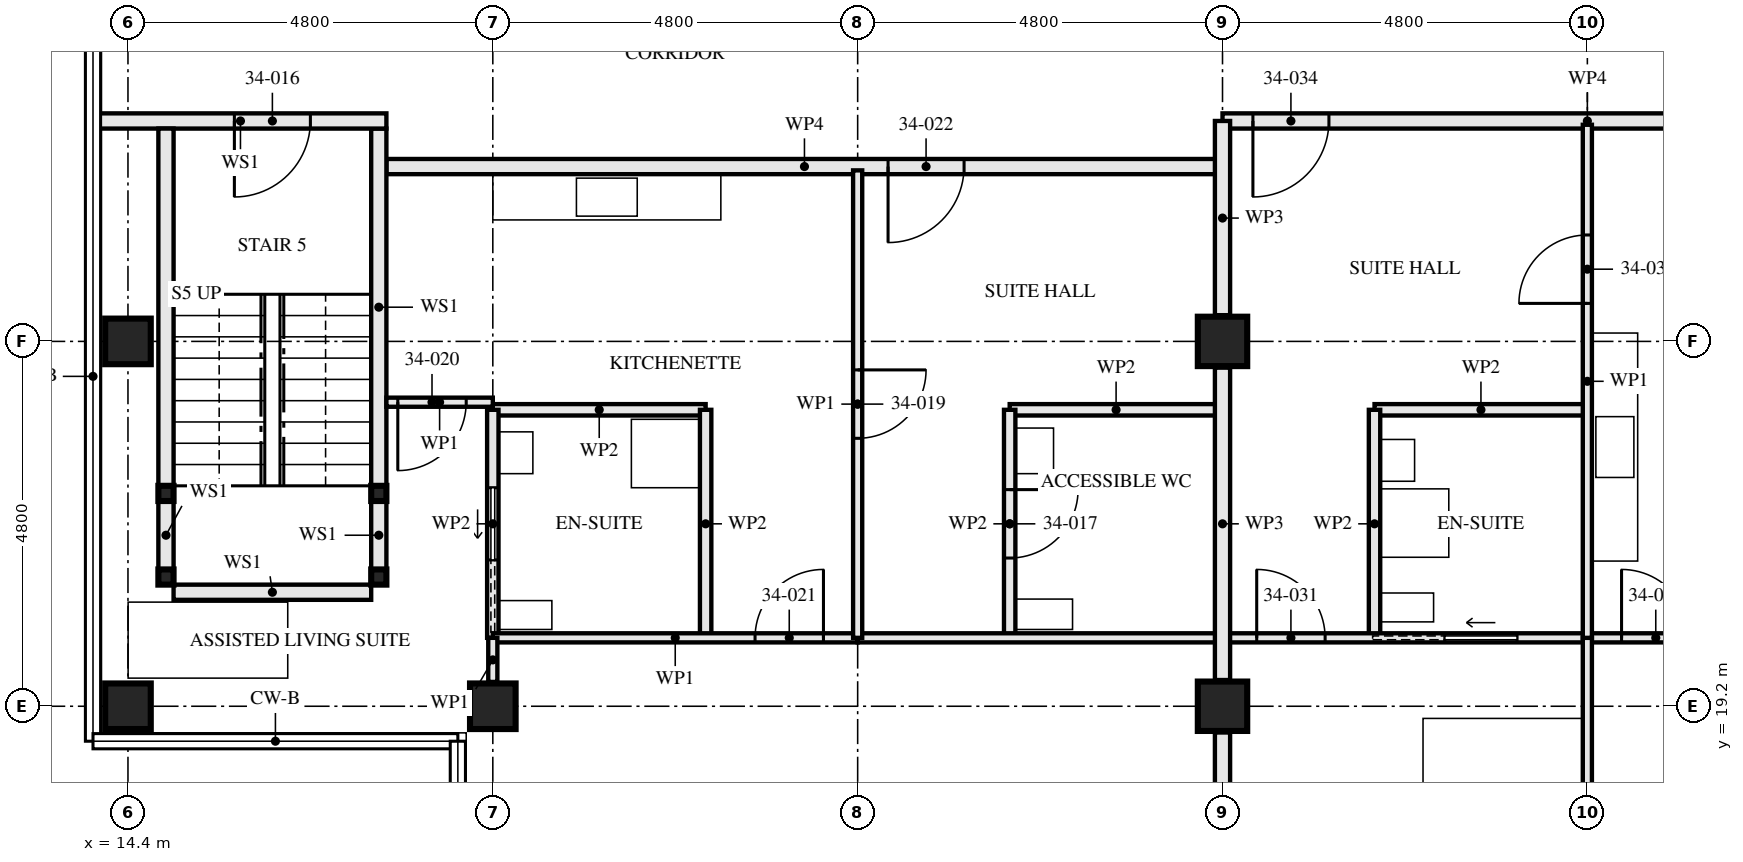
"""IFC4 building model, lengths in metres.
Left out: names, types, materials, properties, quantities, classifications, styles, units other than length and angle.
Written with IfcOpenShell. Run it as: python <this file> out.ifc"""

import sys

from ifc_helpers import new_model, si_unit, direction, frame, frame_2d, origin, origin_2d, place, context, subcontext, project, spatial, rectangle, hollow_rectangle, extrude, element, fill, save


model = new_model("IFC4")
c1 = context("Model", 3, precision=1e-05, world=origin(), true_north=direction((0.0, 1.0)))
c2 = subcontext(c1, "Body", "Model", "MODEL_VIEW")
j1 = project(units=[si_unit("LENGTHUNIT", "METRE"), si_unit("PLANEANGLEUNIT", "RADIAN")], contexts=[c1])
p1 = place(None, origin())
s1 = spatial("IfcSite", under=j1, at=p1, CompositionType="ELEMENT")
p2 = place(p1, origin())
s2 = spatial("IfcBuilding", under=s1, at=p2, CompositionType="ELEMENT")
p3 = place(p2, frame((0.0, 0.0, 126.0)))
s3 = spatial("IfcBuildingStorey", under=s2, at=p3, CompositionType="ELEMENT", Elevation=126.0)
for number, where, z_axis, x_axis in (
    (1, (14.4, 19.2, 0.0), (0.0, 0.0, 1.0), (0.0, 1.0, 0.0)),
    (2, (14.4, 24.0, 0.0), (0.0, 0.0, 1.0), (1.0, 0.0, 0.0)),
    (3, (19.2, 19.2, 0.0), (0.0, 0.0, 1.0), (0.0, 1.0, 0.0)),
):
    element("IfcColumn", number, at=place(p3, frame(where, z_axis=z_axis, x_axis=x_axis)), inside=s3, PredefinedType="COLUMN", context=c2, shape_type="SweptSolid", body=[
        extrude(hollow_rectangle(XDim=0.6, YDim=0.6, WallThickness=0.08, at=origin_2d()), origin(), (0.0, 0.0, 1.0), 3.5),
    ])
for number, where, z_axis, x_axis in (
    (4, (28.8, 19.2, 0.0), (0.0, 0.0, 1.0), (1.0, 0.0, 0.0)),
    (5, (28.8, 24.0, 0.0), (0.0, 0.0, 1.0), (1.0, 0.0, 0.0)),
):
    element("IfcColumn", number, at=place(p3, frame(where, z_axis=z_axis, x_axis=x_axis)), inside=s3, PredefinedType="COLUMN", context=c2, shape_type="SweptSolid", body=[
        extrude(hollow_rectangle(XDim=0.65, YDim=0.65, WallThickness=0.05, at=origin_2d()), origin(), (0.0, 0.0, 1.0), 3.5),
    ])
for number, where, z_axis, x_axis in (
    (6, (14.9, 20.9, 0.0), (0.0, 0.0, 1.0), (1.0, 0.0, 0.0)),
    (7, (17.7, 20.9, 0.0), (0.0, 0.0, 1.0), (1.0, 0.0, 0.0)),
    (8, (14.9, 22.0, 0.0), (0.0, 0.0, 1.0), (1.0, 0.0, 0.0)),
    (9, (17.7, 22.0, 0.0), (0.0, 0.0, 1.0), (1.0, 0.0, 0.0)),
):
    element("IfcColumn", number, at=place(p3, frame(where, z_axis=z_axis, x_axis=x_axis)), inside=s3, PredefinedType="COLUMN", context=c2, shape_type="SweptSolid", body=[
        extrude(hollow_rectangle(XDim=0.2, YDim=0.2, WallThickness=0.008, at=origin_2d()), origin(), (0.0, 0.0, 1.0), 3.33),
    ])
p4 = place(p3, frame((14.9, 21.0, 0.0), z_axis=(0.0, 0.0, 1.0), x_axis=(0.0, 1.0, 0.0)))
e10 = element("IfcWall", 10, at=p4, inside=s3, PredefinedType="SOLIDWALL", context=c2, shape_type="SweptSolid", body=[
    extrude(rectangle(XDim=0.9, YDim=0.2, at=frame_2d((0.45, 0.0))), origin(), (0.0, 0.0, 1.0), 2.99),
])
p5 = place(p3, frame((14.9, 22.1, 0.0), z_axis=(0.0, 0.0, 1.0), x_axis=(0.0, 1.0, 0.0)))
e11 = element("IfcWall", 11, at=p5, inside=s3, PredefinedType="SOLIDWALL", context=c2, shape_type="SweptSolid", body=[
    extrude(rectangle(XDim=4.7, YDim=0.2, at=frame_2d((2.35, 0.0))), origin(), (0.0, 0.0, 1.0), 2.99),
])
p6 = place(p3, frame((17.7, 21.0, 0.0), z_axis=(0.0, 0.0, 1.0), x_axis=(0.0, 1.0, 0.0)))
e12 = element("IfcWall", 12, at=p6, inside=s3, PredefinedType="SOLIDWALL", context=c2, shape_type="SweptSolid", body=[
    extrude(rectangle(XDim=0.9, YDim=0.2, at=frame_2d((0.45, 0.0))), origin(), (0.0, 0.0, 1.0), 2.99),
])
p7 = place(p3, frame((17.7, 22.1, 0.0), z_axis=(0.0, 0.0, 1.0), x_axis=(0.0, 1.0, 0.0)))
e13 = element("IfcWall", 13, at=p7, inside=s3, PredefinedType="SOLIDWALL", context=c2, shape_type="SweptSolid", body=[
    extrude(rectangle(XDim=4.7, YDim=0.2, at=frame_2d((2.35, 0.0))), origin(), (0.0, 0.0, 1.0), 2.99),
])
p8 = place(p3, frame((15.0, 20.7, 0.0), z_axis=(0.0, 0.0, 1.0), x_axis=(1.0, 0.0, 0.0)))
e14 = element("IfcWall", 14, at=p8, inside=s3, PredefinedType="SOLIDWALL", context=c2, shape_type="SweptSolid", body=[
    extrude(rectangle(XDim=2.6, YDim=0.2, at=frame_2d((1.3, 0.0))), origin(), (0.0, 0.0, 1.0), 3.33),
])
p9 = place(p3, frame((13.96, 26.9, 0.0), z_axis=(0.0, 0.0, 1.0), x_axis=(1.0, 0.0, 0.0)))
e15 = element("IfcWall", 15, at=p9, inside=s3, PredefinedType="SOLIDWALL", context=c2, shape_type="SweptSolid", body=[
    extrude(rectangle(XDim=3.84, YDim=0.2, at=frame_2d((1.92, 0.0))), origin(), (0.0, 0.0, 1.0), 2.32),
])
p10 = place(p9, frame((1.84, 0.0, 0.0)))
e16 = element("IfcOpeningElement", 16, at=p10, cuts=e15, PredefinedType="OPENING", context=c2, shape_type="SweptSolid", body=[
    extrude(rectangle(XDim=1.0, YDim=2.1, at=frame_2d((0.5, 1.05))), frame((0.0, 0.111, 0.0), z_axis=(0.0, -1.0, 0.0), x_axis=(1.0, 0.0, 0.0)), (0.0, 0.0, 1.0), 0.221),
])
p11 = place(p3, frame((26.0, 20.1, 0.0), z_axis=(0.0, 0.0, 1.0), x_axis=(0.0, 1.0, 0.0)))
e17 = element("IfcWall", 17, at=p11, inside=s3, PredefinedType="PARTITIONING", context=c2, shape_type="SweptSolid", body=[
    extrude(rectangle(XDim=3.0, YDim=0.15, at=frame_2d((1.5, 0.0))), origin(), (0.0, 0.0, 1.0), 3.33),
])
p12 = place(p11, frame((1.05, 0.0, 0.0)))
e18 = element("IfcOpeningElement", 18, at=p12, cuts=e17, PredefinedType="OPENING", context=c2, shape_type="SweptSolid", body=[
    extrude(rectangle(XDim=0.9, YDim=2.1, at=frame_2d((0.45, 1.05))), frame((0.0, 0.085, 0.0), z_axis=(0.0, -1.0, 0.0), x_axis=(1.0, 0.0, 0.0)), (0.0, 0.0, 1.0), 0.171),
])
p13 = place(p3, frame((26.0, 23.1, 0.0), z_axis=(0.0, 0.0, 1.0), x_axis=(1.0, 0.0, 0.0)))
e19 = element("IfcWall", 19, at=p13, inside=s3, PredefinedType="PARTITIONING", context=c2, shape_type="SweptSolid", body=[
    extrude(rectangle(XDim=2.8, YDim=0.15, at=frame_2d((1.4, 0.0))), origin(), (0.0, 0.0, 1.0), 3.33),
])
p14 = place(p3, frame((19.2, 20.1, 0.0), z_axis=(0.0, 0.0, 1.0), x_axis=(0.0, 1.0, 0.0)))
e20 = element("IfcWall", 20, at=p14, inside=s3, PredefinedType="PARTITIONING", context=c2, shape_type="SweptSolid", body=[
    extrude(rectangle(XDim=3.0, YDim=0.15, at=frame_2d((1.5, 0.0))), origin(), (0.0, 0.0, 1.0), 2.55),
])
p15 = place(p14, frame((1.025, 0.0, 0.0)))
e21 = element("IfcOpeningElement", 21, at=p15, cuts=e20, PredefinedType="OPENING", context=c2, shape_type="SweptSolid", body=[
    extrude(rectangle(XDim=0.95, YDim=2.1, at=frame_2d((0.475, 1.05))), frame((0.0, 0.085, 0.0), z_axis=(0.0, -1.0, 0.0), x_axis=(1.0, 0.0, 0.0)), (0.0, 0.0, 1.0), 0.171),
])
p16 = place(p3, frame((22.0, 20.1, 0.0), z_axis=(0.0, 0.0, 1.0), x_axis=(0.0, 1.0, 0.0)))
e22 = element("IfcWall", 22, at=p16, inside=s3, PredefinedType="PARTITIONING", context=c2, shape_type="SweptSolid", body=[
    extrude(rectangle(XDim=3.0, YDim=0.15, at=frame_2d((1.5, 0.0))), origin(), (0.0, 0.0, 1.0), 3.33),
])
p17 = place(p3, frame((19.2, 23.1, 0.0), z_axis=(0.0, 0.0, 1.0), x_axis=(1.0, 0.0, 0.0)))
e23 = element("IfcWall", 23, at=p17, inside=s3, PredefinedType="PARTITIONING", context=c2, shape_type="SweptSolid", body=[
    extrude(rectangle(XDim=2.8, YDim=0.15, at=frame_2d((1.4, 0.0))), origin(), (0.0, 0.0, 1.0), 3.33),
])
p18 = place(p3, frame((24.0, 20.1, 0.0), z_axis=(0.0, 0.0, 1.0), x_axis=(0.0, 1.0, 0.0)))
e24 = element("IfcWall", 24, at=p18, inside=s3, PredefinedType="PARTITIONING", context=c2, shape_type="SweptSolid", body=[
    extrude(rectangle(XDim=6.15, YDim=0.12, at=frame_2d((3.075, 0.0))), origin(), (0.0, 0.0, 1.0), 2.55),
])
p19 = place(p18, frame((2.625, 0.0, 0.0)))
e25 = element("IfcOpeningElement", 25, at=p19, cuts=e24, PredefinedType="OPENING", context=c2, shape_type="SweptSolid", body=[
    extrude(rectangle(XDim=0.9, YDim=2.1, at=frame_2d((0.45, 1.05))), frame((0.0, 0.071, 0.0), z_axis=(0.0, -1.0, 0.0), x_axis=(1.0, 0.0, 0.0)), (0.0, 0.0, 1.0), 0.141),
])
p20 = place(p3, frame((17.8, 23.2, 0.0), z_axis=(0.0, 0.0, 1.0), x_axis=(1.0, 0.0, 0.0)))
e26 = element("IfcWall", 26, at=p20, inside=s3, PredefinedType="PARTITIONING", context=c2, shape_type="SweptSolid", body=[
    extrude(rectangle(XDim=1.4, YDim=0.12, at=frame_2d((0.7, 0.0))), origin(), (0.0, 0.0, 1.0), 3.33),
])
p21 = place(p20, frame((0.15, 0.0, 0.0)))
e27 = element("IfcOpeningElement", 27, at=p21, cuts=e26, PredefinedType="OPENING", context=c2, shape_type="SweptSolid", body=[
    extrude(rectangle(XDim=0.9, YDim=2.1, at=frame_2d((0.45, 1.05))), frame((0.0, 0.071, 0.0), z_axis=(0.0, -1.0, 0.0), x_axis=(1.0, 0.0, 0.0)), (0.0, 0.0, 1.0), 0.141),
])
p22 = place(p3, frame((19.2, 20.1, 0.0), z_axis=(0.0, 0.0, 1.0), x_axis=(1.0, 0.0, 0.0)))
e28 = element("IfcWall", 28, at=p22, inside=s3, PredefinedType="PARTITIONING", context=c2, shape_type="SweptSolid", body=[
    extrude(rectangle(XDim=4.8, YDim=0.12, at=frame_2d((2.4, 0.0))), origin(), (0.0, 0.0, 1.0), 3.33),
])
p23 = place(p22, frame((3.45, 0.0, 0.0)))
e29 = element("IfcOpeningElement", 29, at=p23, cuts=e28, PredefinedType="OPENING", context=c2, shape_type="SweptSolid", body=[
    extrude(rectangle(XDim=0.9, YDim=2.1, at=frame_2d((0.45, 1.05))), frame((0.0, 0.071, 0.0), z_axis=(0.0, -1.0, 0.0), x_axis=(1.0, 0.0, 0.0)), (0.0, 0.0, 1.0), 0.141),
])
p24 = place(p3, frame((24.0, 20.1, 0.0), z_axis=(0.0, 0.0, 1.0), x_axis=(1.0, 0.0, 0.0)))
e30 = element("IfcWall", 30, at=p24, inside=s3, PredefinedType="PARTITIONING", context=c2, shape_type="SweptSolid", body=[
    extrude(rectangle(XDim=4.8, YDim=0.12, at=frame_2d((2.4, 0.0))), origin(), (0.0, 0.0, 1.0), 3.33),
])
p25 = place(p3, frame((19.2, 19.52, 0.0), z_axis=(0.0, 0.0, 1.0), x_axis=(0.0, 1.0, 0.0)))
e31 = element("IfcWall", 31, at=p25, inside=s3, PredefinedType="PARTITIONING", context=c2, shape_type="SweptSolid", body=[
    extrude(rectangle(XDim=0.58, YDim=0.12, at=frame_2d((0.29, 0.0))), origin(), (0.0, 0.0, 1.0), 2.55),
])
p26 = place(p3, frame((17.8, 26.3, 0.0), z_axis=(0.0, 0.0, 1.0), x_axis=(1.0, 0.0, 0.0)))
e32 = element("IfcWall", 32, at=p26, inside=s3, PredefinedType="PARTITIONING", context=c2, shape_type="SweptSolid", body=[
    extrude(rectangle(XDim=11.0, YDim=0.2, at=frame_2d((5.5, 0.0))), origin(), (0.0, 0.0, 1.0), 2.55),
])
p27 = place(p26, frame((6.6, 0.0, 0.0)))
e33 = element("IfcOpeningElement", 33, at=p27, cuts=e32, PredefinedType="OPENING", context=c2, shape_type="SweptSolid", body=[
    extrude(rectangle(XDim=1.0, YDim=2.1, at=frame_2d((0.5, 1.05))), frame((0.0, 0.111, 0.0), z_axis=(0.0, -1.0, 0.0), x_axis=(1.0, 0.0, 0.0)), (0.0, 0.0, 1.0), 0.221),
])
p28 = place(p3, frame((30.8, 20.1, 0.0), z_axis=(0.0, 0.0, 1.0), x_axis=(0.0, 1.0, 0.0)))
e34 = element("IfcWall", 34, at=p28, inside=s3, PredefinedType="PARTITIONING", context=c2, shape_type="SweptSolid", body=[
    extrude(rectangle(XDim=3.0, YDim=0.15, at=frame_2d((1.5, 0.0))), origin(), (0.0, 0.0, 1.0), 3.33),
])
p29 = place(p3, frame((30.8, 23.1, 0.0), z_axis=(0.0, 0.0, 1.0), x_axis=(1.0, 0.0, 0.0)))
e35 = element("IfcWall", 35, at=p29, inside=s3, PredefinedType="PARTITIONING", context=c2, shape_type="SweptSolid", body=[
    extrude(rectangle(XDim=2.8, YDim=0.15, at=frame_2d((1.4, 0.0))), origin(), (0.0, 0.0, 1.0), 3.33),
])
p30 = place(p3, frame((33.6, 20.1, 0.0), z_axis=(0.0, 0.0, 1.0), x_axis=(0.0, 1.0, 0.0)))
e36 = element("IfcWall", 36, at=p30, inside=s3, PredefinedType="PARTITIONING", context=c2, shape_type="SweptSolid", body=[
    extrude(rectangle(XDim=6.75, YDim=0.12, at=frame_2d((3.375, 0.0))), origin(), (0.0, 0.0, 1.0), 2.55),
])
p31 = place(p30, frame((4.4, 0.0, 0.0)))
e37 = element("IfcOpeningElement", 37, at=p31, cuts=e36, PredefinedType="OPENING", context=c2, shape_type="SweptSolid", body=[
    extrude(rectangle(XDim=0.9, YDim=2.1, at=frame_2d((0.45, 1.05))), frame((0.0, 0.071, 0.0), z_axis=(0.0, -1.0, 0.0), x_axis=(1.0, 0.0, 0.0)), (0.0, 0.0, 1.0), 0.141),
])
p32 = place(p3, frame((28.8, 20.1, 0.0), z_axis=(0.0, 0.0, 1.0), x_axis=(1.0, 0.0, 0.0)))
e38 = element("IfcWall", 38, at=p32, inside=s3, PredefinedType="PARTITIONING", context=c2, shape_type="SweptSolid", body=[
    extrude(rectangle(XDim=4.8, YDim=0.12, at=frame_2d((2.4, 0.0))), origin(), (0.0, 0.0, 1.0), 3.33),
])
p33 = place(p32, frame((0.45, 0.0, 0.0)))
e39 = element("IfcOpeningElement", 39, at=p33, cuts=e38, PredefinedType="OPENING", context=c2, shape_type="SweptSolid", body=[
    extrude(rectangle(XDim=0.9, YDim=2.1, at=frame_2d((0.45, 1.05))), frame((0.0, 0.071, 0.0), z_axis=(0.0, -1.0, 0.0), x_axis=(1.0, 0.0, 0.0)), (0.0, 0.0, 1.0), 0.141),
])
p34 = place(p32, frame((2.925, 0.0, 0.0)))
e40 = element("IfcOpeningElement", 40, at=p34, cuts=e38, PredefinedType="OPENING", context=c2, shape_type="SweptSolid", body=[
    extrude(rectangle(XDim=0.95, YDim=2.1, at=frame_2d((0.475, 1.05))), frame((0.0, 0.071, 0.0), z_axis=(0.0, -1.0, 0.0), x_axis=(1.0, 0.0, 0.0)), (0.0, 0.0, 1.0), 0.141),
])
p35 = place(p3, frame((33.6, 20.1, 0.0), z_axis=(0.0, 0.0, 1.0), x_axis=(1.0, 0.0, 0.0)))
e41 = element("IfcWall", 41, at=p35, inside=s3, PredefinedType="PARTITIONING", context=c2, shape_type="SweptSolid", body=[
    extrude(rectangle(XDim=4.8, YDim=0.12, at=frame_2d((2.4, 0.0))), origin(), (0.0, 0.0, 1.0), 3.33),
])
p36 = place(p35, frame((0.45, 0.0, 0.0)))
e42 = element("IfcOpeningElement", 42, at=p36, cuts=e41, PredefinedType="OPENING", context=c2, shape_type="SweptSolid", body=[
    extrude(rectangle(XDim=0.9, YDim=2.1, at=frame_2d((0.45, 1.05))), frame((0.0, 0.071, 0.0), z_axis=(0.0, -1.0, 0.0), x_axis=(1.0, 0.0, 0.0)), (0.0, 0.0, 1.0), 0.141),
])
p37 = place(p3, frame((33.6, 14.72, 0.0), z_axis=(0.0, 0.0, 1.0), x_axis=(0.0, 1.0, 0.0)))
e43 = element("IfcWall", 43, at=p37, inside=s3, PredefinedType="PARTITIONING", context=c2, shape_type="SweptSolid", body=[
    extrude(rectangle(XDim=5.38, YDim=0.12, at=frame_2d((2.69, 0.0))), origin(), (0.0, 0.0, 1.0), 2.55),
])
p38 = place(p3, frame((28.8, 26.9, 0.0), z_axis=(0.0, 0.0, 1.0), x_axis=(1.0, 0.0, 0.0)))
e44 = element("IfcWall", 44, at=p38, inside=s3, PredefinedType="PARTITIONING", context=c2, shape_type="SweptSolid", body=[
    extrude(rectangle(XDim=9.6, YDim=0.2, at=frame_2d((4.8, 0.0))), origin(), (0.0, 0.0, 1.0), 3.33),
])
p39 = place(p38, frame((0.4, 0.0, 0.0)))
e45 = element("IfcOpeningElement", 45, at=p39, cuts=e44, PredefinedType="OPENING", context=c2, shape_type="SweptSolid", body=[
    extrude(rectangle(XDim=1.0, YDim=2.1, at=frame_2d((0.5, 1.05))), frame((0.0, 0.111, 0.0), z_axis=(0.0, -1.0, 0.0), x_axis=(1.0, 0.0, 0.0)), (0.0, 0.0, 1.0), 0.221),
])
p40 = place(p3, frame((28.8, 14.72, 0.0), z_axis=(0.0, 0.0, 1.0), x_axis=(0.0, 1.0, 0.0)))
e46 = element("IfcWall", 46, at=p40, inside=s3, PredefinedType="PARTITIONING", context=c2, shape_type="SweptSolid", body=[
    extrude(rectangle(XDim=4.135, YDim=0.2, at=frame_2d((2.067, 0.0))), origin(), (0.0, 0.0, 1.0), 2.32),
])
p41 = place(p3, frame((28.8, 19.545, 0.0), z_axis=(0.0, 0.0, 1.0), x_axis=(0.0, 1.0, 0.0)))
e47 = element("IfcWall", 47, at=p41, inside=s3, PredefinedType="PARTITIONING", context=c2, shape_type="SweptSolid", body=[
    extrude(rectangle(XDim=4.11, YDim=0.2, at=frame_2d((2.055, 0.0))), origin(), (0.0, 0.0, 1.0), 2.32),
])
p42 = place(p3, frame((28.8, 24.345, 0.0), z_axis=(0.0, 0.0, 1.0), x_axis=(0.0, 1.0, 0.0)))
e48 = element("IfcWall", 48, at=p42, inside=s3, PredefinedType="PARTITIONING", context=c2, shape_type="SweptSolid", body=[
    extrude(rectangle(XDim=2.555, YDim=0.2, at=frame_2d((1.277, 0.0))), origin(), (0.0, 0.0, 1.0), 2.32),
])
p43 = place(p10, frame((1.0, 0.0, 0.0), z_axis=(0.0, 0.0, 1.0), x_axis=(-1.0, 0.0, 0.0)))
e49 = element("IfcDoor", 49, at=p43, inside=s3, OperationType="SINGLE_SWING_LEFT", PredefinedType="DOOR", context=c2, shape_type="SweptSolid", body=[
    extrude(rectangle(XDim=1.0, YDim=2.1, at=frame_2d((0.5, 1.05))), frame((0.0, 0.032, 0.0), z_axis=(0.0, -1.0, 0.0), x_axis=(1.0, 0.0, 0.0)), (0.0, 0.0, 1.0), 0.064),
])
fill(e16, e49)
p44 = place(p12, frame((0.9, 0.0, 0.0), z_axis=(0.0, 0.0, 1.0), x_axis=(-1.0, 0.0, 0.0)))
e50 = element("IfcDoor", 50, at=p44, inside=s3, OperationType="SINGLE_SWING_RIGHT", PredefinedType="DOOR", context=c2, shape_type="SweptSolid", body=[
    extrude(rectangle(XDim=0.9, YDim=2.1, at=frame_2d((0.45, 1.05))), frame((0.0, 0.022, 0.0), z_axis=(0.0, -1.0, 0.0), x_axis=(1.0, 0.0, 0.0)), (0.0, 0.0, 1.0), 0.044),
])
fill(e18, e50)
p45 = place(p15, origin())
e51 = element("IfcDoor", 51, at=p45, inside=s3, OperationType="SLIDING_TO_RIGHT", PredefinedType="DOOR", context=c2, shape_type="SweptSolid", body=[
    extrude(rectangle(XDim=0.95, YDim=2.1, at=frame_2d((0.475, 1.05))), frame((0.0, 0.022, 0.0), z_axis=(0.0, -1.0, 0.0), x_axis=(1.0, 0.0, 0.0)), (0.0, 0.0, 1.0), 0.044),
])
fill(e21, e51)
p46 = place(p19, frame((0.9, 0.0, 0.0), z_axis=(0.0, 0.0, 1.0), x_axis=(-1.0, 0.0, 0.0)))
e52 = element("IfcDoor", 52, at=p46, inside=s3, OperationType="SINGLE_SWING_RIGHT", PredefinedType="DOOR", context=c2, shape_type="SweptSolid", body=[
    extrude(rectangle(XDim=0.9, YDim=2.1, at=frame_2d((0.45, 1.05))), frame((0.0, 0.022, 0.0), z_axis=(0.0, -1.0, 0.0), x_axis=(1.0, 0.0, 0.0)), (0.0, 0.0, 1.0), 0.044),
])
fill(e25, e52)
p47 = place(p21, frame((0.9, 0.0, 0.0), z_axis=(0.0, 0.0, 1.0), x_axis=(-1.0, 0.0, 0.0)))
e53 = element("IfcDoor", 53, at=p47, inside=s3, OperationType="SINGLE_SWING_LEFT", PredefinedType="DOOR", context=c2, shape_type="SweptSolid", body=[
    extrude(rectangle(XDim=0.9, YDim=2.1, at=frame_2d((0.45, 1.05))), frame((0.0, 0.022, 0.0), z_axis=(0.0, -1.0, 0.0), x_axis=(1.0, 0.0, 0.0)), (0.0, 0.0, 1.0), 0.044),
])
fill(e27, e53)
p48 = place(p23, origin())
e54 = element("IfcDoor", 54, at=p48, inside=s3, OperationType="SINGLE_SWING_LEFT", PredefinedType="DOOR", context=c2, shape_type="SweptSolid", body=[
    extrude(rectangle(XDim=0.9, YDim=2.1, at=frame_2d((0.45, 1.05))), frame((0.0, 0.022, 0.0), z_axis=(0.0, -1.0, 0.0), x_axis=(1.0, 0.0, 0.0)), (0.0, 0.0, 1.0), 0.044),
])
fill(e29, e54)
p49 = place(p27, frame((1.0, 0.0, 0.0), z_axis=(0.0, 0.0, 1.0), x_axis=(-1.0, 0.0, 0.0)))
e55 = element("IfcDoor", 55, at=p49, inside=s3, OperationType="SINGLE_SWING_LEFT", PredefinedType="DOOR", context=c2, shape_type="SweptSolid", body=[
    extrude(rectangle(XDim=1.0, YDim=2.1, at=frame_2d((0.5, 1.05))), frame((0.0, 0.027, 0.0), z_axis=(0.0, -1.0, 0.0), x_axis=(1.0, 0.0, 0.0)), (0.0, 0.0, 1.0), 0.054),
])
fill(e33, e55)
p50 = place(p31, origin())
e56 = element("IfcDoor", 56, at=p50, inside=s3, OperationType="SINGLE_SWING_RIGHT", PredefinedType="DOOR", context=c2, shape_type="SweptSolid", body=[
    extrude(rectangle(XDim=0.9, YDim=2.1, at=frame_2d((0.45, 1.05))), frame((0.0, 0.022, 0.0), z_axis=(0.0, -1.0, 0.0), x_axis=(1.0, 0.0, 0.0)), (0.0, 0.0, 1.0), 0.044),
])
fill(e37, e56)
p51 = place(p33, origin())
e57 = element("IfcDoor", 57, at=p51, inside=s3, OperationType="SINGLE_SWING_RIGHT", PredefinedType="DOOR", context=c2, shape_type="SweptSolid", body=[
    extrude(rectangle(XDim=0.9, YDim=2.1, at=frame_2d((0.45, 1.05))), frame((0.0, 0.022, 0.0), z_axis=(0.0, -1.0, 0.0), x_axis=(1.0, 0.0, 0.0)), (0.0, 0.0, 1.0), 0.044),
])
fill(e39, e57)
p52 = place(p34, origin())
e58 = element("IfcDoor", 58, at=p52, inside=s3, OperationType="SLIDING_TO_RIGHT", PredefinedType="DOOR", context=c2, shape_type="SweptSolid", body=[
    extrude(rectangle(XDim=0.95, YDim=2.1, at=frame_2d((0.475, 1.05))), frame((0.0, 0.022, 0.0), z_axis=(0.0, -1.0, 0.0), x_axis=(1.0, 0.0, 0.0)), (0.0, 0.0, 1.0), 0.044),
])
fill(e40, e58)
p53 = place(p36, origin())
e59 = element("IfcDoor", 59, at=p53, inside=s3, OperationType="SINGLE_SWING_RIGHT", PredefinedType="DOOR", context=c2, shape_type="SweptSolid", body=[
    extrude(rectangle(XDim=0.9, YDim=2.1, at=frame_2d((0.45, 1.05))), frame((0.0, 0.022, 0.0), z_axis=(0.0, -1.0, 0.0), x_axis=(1.0, 0.0, 0.0)), (0.0, 0.0, 1.0), 0.044),
])
fill(e42, e59)
p54 = place(p39, frame((1.0, 0.0, 0.0), z_axis=(0.0, 0.0, 1.0), x_axis=(-1.0, 0.0, 0.0)))
e60 = element("IfcDoor", 60, at=p54, inside=s3, OperationType="SINGLE_SWING_LEFT", PredefinedType="DOOR", context=c2, shape_type="SweptSolid", body=[
    extrude(rectangle(XDim=1.0, YDim=2.1, at=frame_2d((0.5, 1.05))), frame((0.0, 0.027, 0.0), z_axis=(0.0, -1.0, 0.0), x_axis=(1.0, 0.0, 0.0)), (0.0, 0.0, 1.0), 0.054),
])
fill(e45, e60)
save(model, sys.argv[1])
